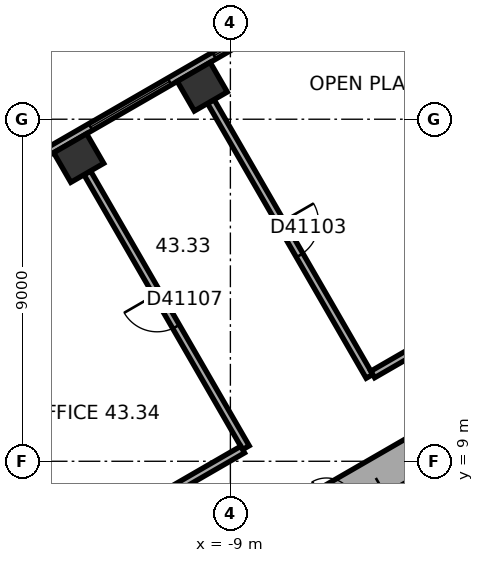
"""IFC4 building model, lengths in metres.
Left out: names, types, materials, properties, quantities, classifications, styles, units other than length and angle.
Written with IfcOpenShell. Run it as: python <this file> out.ifc"""

import sys

from ifc_helpers import new_model, si_unit, direction, frame, frame_2d, origin, origin_2d, place, context, subcontext, project, spatial, rectangle, extrude, element, fill, save


model = new_model("IFC4")
c1 = context("Model", 3, precision=1e-05, world=origin(), true_north=direction((0.0, 1.0)))
c2 = subcontext(c1, "Body", "Model", "MODEL_VIEW")
j1 = project(units=[si_unit("LENGTHUNIT", "METRE"), si_unit("PLANEANGLEUNIT", "RADIAN")], contexts=[c1])
p1 = place(None, origin())
s1 = spatial("IfcSite", under=j1, at=p1, CompositionType="ELEMENT")
p2 = place(p1, origin())
s2 = spatial("IfcBuilding", under=s1, at=p2, CompositionType="ELEMENT")
p3 = place(p2, frame((0.0, 0.0, 176.2)))
s3 = spatial("IfcBuildingStorey", under=s2, at=p3, CompositionType="ELEMENT", Elevation=176.2)
for number, where, z_axis, x_axis in (
    (1, (-9.74, 18.856, 0.0), (0.0, 0.0, 1.0), (-0.866, -0.5, 0.0)),
    (2, (-12.991, 16.979, 0.0), (0.0, 0.0, 1.0), (-0.866, -0.5, 0.0)),
):
    element("IfcColumn", number, at=place(p3, frame(where, z_axis=z_axis, x_axis=x_axis)), inside=s3, PredefinedType="COLUMN", context=c2, shape_type="SweptSolid", body=[
        extrude(rectangle(XDim=1.0, YDim=0.9, at=origin_2d()), origin(), (0.0, 0.0, 1.0), 3.7),
    ])
p4 = place(p3, frame((0.25, 11.691, 0.0), z_axis=(0.0, 0.0, 1.0), x_axis=(-0.866022616891, -0.50000482701, 0.0)))
e3 = element("IfcWall", 3, at=p4, inside=s3, PredefinedType="SHEAR", context=c2, shape_type="SweptSolid", body=[
    extrude(rectangle(XDim=12.125, YDim=1.0, at=frame_2d((6.062, 0.0))), origin(), (0.0, 0.0, 1.0), 3.7),
])
p5 = place(p4, frame((6.262, 0.0, 0.0)))
e4 = element("IfcOpeningElement", 4, at=p5, cuts=e3, PredefinedType="OPENING", context=c2, shape_type="SweptSolid", body=[
    extrude(rectangle(XDim=1.5, YDim=2.1, at=frame_2d((0.75, 1.05))), frame((0.0, 0.51, 0.0), z_axis=(0.0, -1.0, 0.0), x_axis=(1.0, 0.0, 0.0)), (0.0, 0.0, 1.0), 1.02),
])
p6 = place(p4, frame((3.112, 0.0, 0.0)))
e5 = element("IfcOpeningElement", 5, at=p6, cuts=e3, PredefinedType="OPENING", context=c2, shape_type="SweptSolid", body=[
    extrude(rectangle(XDim=0.9, YDim=2.1, at=frame_2d((0.45, 1.05))), frame((0.0, 0.51, 0.0), z_axis=(0.0, -1.0, 0.0), x_axis=(1.0, 0.0, 0.0)), (0.0, 0.0, 1.0), 1.02),
])
p7 = place(p3, frame((-2.961, 23.405, 0.0), z_axis=(0.0, 0.0, 1.0), x_axis=(-0.866023315909, -0.500003616288, 0.0)))
e6 = element("IfcWall", 6, at=p7, inside=s3, PredefinedType="STANDARD", context=c2, shape_type="SweptSolid", body=[
    extrude(rectangle(XDim=20.044, YDim=0.2, at=frame_2d((10.022, 0.0))), origin(), (0.0, 0.0, 1.0), 3.7),
])
p8 = place(p7, frame((1.314, 0.0, 0.9)))
e7 = element("IfcOpeningElement", 7, at=p8, cuts=e6, PredefinedType="OPENING", context=c2, shape_type="SweptSolid", body=[
    extrude(rectangle(XDim=2.4, YDim=2.0, at=frame_2d((1.2, 1.0))), frame((0.0, 0.11, 0.0), z_axis=(0.0, -1.0, 0.0), x_axis=(1.0, 0.0, 0.0)), (0.0, 0.0, 1.0), 0.22),
])
p9 = place(p7, frame((5.069, 0.0, 0.9)))
e8 = element("IfcOpeningElement", 8, at=p9, cuts=e6, PredefinedType="OPENING", context=c2, shape_type="SweptSolid", body=[
    extrude(rectangle(XDim=2.4, YDim=2.0, at=frame_2d((1.2, 1.0))), frame((0.0, 0.11, 0.0), z_axis=(0.0, -1.0, 0.0), x_axis=(1.0, 0.0, 0.0)), (0.0, 0.0, 1.0), 0.22),
])
p10 = place(p7, frame((8.823, 0.0, 0.9)))
e9 = element("IfcOpeningElement", 9, at=p10, cuts=e6, PredefinedType="OPENING", context=c2, shape_type="SweptSolid", body=[
    extrude(rectangle(XDim=2.4, YDim=2.0, at=frame_2d((1.2, 1.0))), frame((0.0, 0.11, 0.0), z_axis=(0.0, -1.0, 0.0), x_axis=(1.0, 0.0, 0.0)), (0.0, 0.0, 1.0), 0.22),
])
p11 = place(p7, frame((12.577, 0.0, 0.9)))
e10 = element("IfcOpeningElement", 10, at=p11, cuts=e6, PredefinedType="OPENING", context=c2, shape_type="SweptSolid", body=[
    extrude(rectangle(XDim=2.4, YDim=2.0, at=frame_2d((1.2, 1.0))), frame((0.0, 0.11, 0.0), z_axis=(0.0, -1.0, 0.0), x_axis=(1.0, 0.0, 0.0)), (0.0, 0.0, 1.0), 0.22),
])
p12 = place(p7, frame((16.331, 0.0, 0.9)))
e11 = element("IfcOpeningElement", 11, at=p12, cuts=e6, PredefinedType="OPENING", context=c2, shape_type="SweptSolid", body=[
    extrude(rectangle(XDim=2.4, YDim=2.0, at=frame_2d((1.2, 1.0))), frame((0.0, 0.11, 0.0), z_axis=(0.0, -1.0, 0.0), x_axis=(1.0, 0.0, 0.0)), (0.0, 0.0, 1.0), 0.22),
])
p13 = place(p3, frame((-12.766, 16.589, 0.0), z_axis=(0.0, 0.0, 1.0), x_axis=(0.500010139422, -0.866019549707, 0.0)))
e12 = element("IfcWall", 12, at=p13, inside=s3, PredefinedType="PARTITIONING", context=c2, shape_type="SweptSolid", body=[
    extrude(rectangle(XDim=8.35, YDim=0.2, at=frame_2d((4.175, 0.0))), origin(), (0.0, 0.0, 1.0), 3.42),
])
p14 = place(p13, frame((3.675, 0.0, 0.0)))
e13 = element("IfcOpeningElement", 13, at=p14, cuts=e12, PredefinedType="OPENING", context=c2, shape_type="SweptSolid", body=[
    extrude(rectangle(XDim=1.0, YDim=2.1, at=frame_2d((0.5, 1.05))), frame((0.0, 0.11, 0.0), z_axis=(0.0, -1.0, 0.0), x_axis=(1.0, 0.0, 0.0)), (0.0, 0.0, 1.0), 0.22),
])
p15 = place(p3, frame((-9.515, 18.466, 0.0), z_axis=(0.0, 0.0, 1.0), x_axis=(0.500010139422, -0.866019549707, 0.0)))
e14 = element("IfcWall", 14, at=p15, inside=s3, PredefinedType="PARTITIONING", context=c2, shape_type="SweptSolid", body=[
    extrude(rectangle(XDim=8.35, YDim=0.2, at=frame_2d((4.175, 0.0))), origin(), (0.0, 0.0, 1.0), 2.87),
])
p16 = place(p15, frame((3.675, 0.0, 0.0)))
e15 = element("IfcOpeningElement", 15, at=p16, cuts=e14, PredefinedType="OPENING", context=c2, shape_type="SweptSolid", body=[
    extrude(rectangle(XDim=1.0, YDim=2.1, at=frame_2d((0.5, 1.05))), frame((0.0, 0.11, 0.0), z_axis=(0.0, -1.0, 0.0), x_axis=(1.0, 0.0, 0.0)), (0.0, 0.0, 1.0), 0.22),
])
p17 = place(p3, frame((-8.678, 9.308, 0.0), z_axis=(0.0, 0.0, 1.0), x_axis=(-0.866000359435, -0.500043375578, 0.0)))
e16 = element("IfcWall", 16, at=p17, inside=s3, PredefinedType="PARTITIONING", context=c2, shape_type="SweptSolid", body=[
    extrude(rectangle(XDim=3.161, YDim=0.2, at=frame_2d((1.581, 0.0))), origin(), (0.0, 0.0, 1.0), 3.42),
])
p18 = place(p3, frame((-0.95, 13.77, 0.0), z_axis=(0.0, 0.0, 1.0), x_axis=(-0.866036689987, -0.499980451214, 0.0)))
e17 = element("IfcWall", 17, at=p18, inside=s3, PredefinedType="PARTITIONING", context=c2, shape_type="SweptSolid", body=[
    extrude(rectangle(XDim=4.969, YDim=0.2, at=frame_2d((2.485, 0.0))), origin(), (0.0, 0.0, 1.0), 3.42),
])
p19 = place(p9, origin())
e18 = element("IfcWindow", 18, at=p19, inside=s3, PartitioningType="SINGLE_PANEL", PredefinedType="WINDOW", context=c2, shape_type="SweptSolid", body=[
    extrude(rectangle(XDim=2.4, YDim=2.0, at=frame_2d((1.2, 1.0))), frame((0.0, 0.03, 0.0), z_axis=(0.0, -1.0, 0.0), x_axis=(1.0, 0.0, 0.0)), (0.0, 0.0, 1.0), 0.06),
])
fill(e8, e18)
p20 = place(p10, origin())
e19 = element("IfcWindow", 19, at=p20, inside=s3, PartitioningType="SINGLE_PANEL", PredefinedType="WINDOW", context=c2, shape_type="SweptSolid", body=[
    extrude(rectangle(XDim=2.4, YDim=2.0, at=frame_2d((1.2, 1.0))), frame((0.0, 0.03, 0.0), z_axis=(0.0, -1.0, 0.0), x_axis=(1.0, 0.0, 0.0)), (0.0, 0.0, 1.0), 0.06),
])
fill(e9, e19)
p21 = place(p5, origin())
e20 = element("IfcDoor", 20, at=p21, inside=s3, OperationType="DOUBLE_DOOR_SINGLE_SWING", PredefinedType="DOOR", context=c2, shape_type="SweptSolid", body=[
    extrude(rectangle(XDim=1.5, YDim=2.1, at=frame_2d((0.75, 1.05))), frame((0.0, 0.025, 0.0), z_axis=(0.0, -1.0, 0.0), x_axis=(1.0, 0.0, 0.0)), (0.0, 0.0, 1.0), 0.05),
])
fill(e4, e20)
p22 = place(p16, origin())
e21 = element("IfcDoor", 21, at=p22, inside=s3, OperationType="SINGLE_SWING_LEFT", PredefinedType="DOOR", context=c2, shape_type="SweptSolid", body=[
    extrude(rectangle(XDim=1.0, YDim=2.1, at=frame_2d((0.5, 1.05))), frame((0.0, 0.025, 0.0), z_axis=(0.0, -1.0, 0.0), x_axis=(1.0, 0.0, 0.0)), (0.0, 0.0, 1.0), 0.05),
])
fill(e15, e21)
p23 = place(p14, origin())
e22 = element("IfcDoor", 22, at=p23, inside=s3, OperationType="SINGLE_SWING_LEFT", PredefinedType="DOOR", context=c2, shape_type="SweptSolid", body=[
    extrude(rectangle(XDim=1.0, YDim=2.1, at=frame_2d((0.5, 1.05))), frame((0.0, 0.025, 0.0), z_axis=(0.0, -1.0, 0.0), x_axis=(1.0, 0.0, 0.0)), (0.0, 0.0, 1.0), 0.05),
])
fill(e13, e22)
save(model, sys.argv[1])
